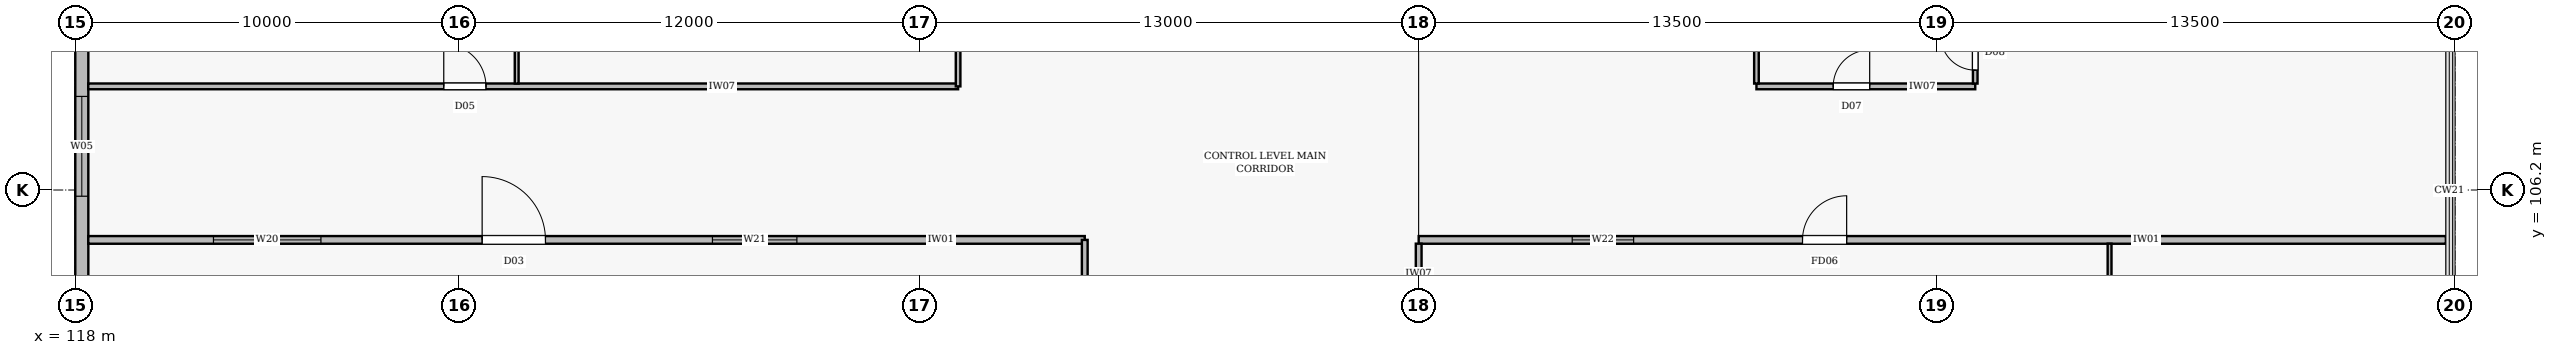
"""IFC4 building model, lengths in metres.
Left out: names, types, materials, properties, quantities, classifications, styles, units other than length and angle.
Written with IfcOpenShell. Run it as: python <this file> out.ifc"""

import sys

from ifc_helpers import new_model, si_unit, direction, frame, frame_2d, origin, place, context, subcontext, project, spatial, rectangle, extrude, element, fill, save


model = new_model("IFC4")
c1 = context("Model", 3, precision=1e-05, world=origin(), true_north=direction((0.0, 1.0)))
c2 = subcontext(c1, "Body", "Model", "MODEL_VIEW")
j1 = project(units=[si_unit("LENGTHUNIT", "METRE"), si_unit("PLANEANGLEUNIT", "RADIAN")], contexts=[c1])
p1 = place(None, origin())
s1 = spatial("IfcSite", under=j1, at=p1, CompositionType="ELEMENT")
p2 = place(p1, origin())
s2 = spatial("IfcBuilding", under=s1, at=p2, CompositionType="ELEMENT")
p3 = place(p2, frame((0.0, 0.0, 17.4)))
s3 = spatial("IfcBuildingStorey", under=s2, at=p3, CompositionType="ELEMENT", Elevation=17.4)
p4 = place(p3, frame((118.17, 101.023, 0.0), z_axis=(0.0, 0.0, 1.0), x_axis=(0.0, 1.0, 0.0)))
e1 = element("IfcWall", 1, at=p4, inside=s3, PredefinedType="STANDARD", context=c2, shape_type="SweptSolid", body=[
    extrude(rectangle(XDim=10.354, YDim=0.34, at=frame_2d((5.177, 0.0))), origin(), (0.0, 0.0, 1.0), 3.22),
])
p5 = place(p4, frame((5.015, 0.0, 0.58)))
e2 = element("IfcOpeningElement", 2, at=p5, cuts=e1, PredefinedType="OPENING", context=c2, shape_type="SweptSolid", body=[
    extrude(rectangle(XDim=2.6, YDim=2.4, at=frame_2d((1.3, 1.2))), frame((0.0, 0.182, 0.0), z_axis=(0.0, -1.0, 0.0), x_axis=(1.0, 0.0, 0.0)), (0.0, 0.0, 1.0), 0.364),
])
p6 = place(p3, frame((118.338, 104.9, 0.0), z_axis=(0.0, 0.0, 1.0), x_axis=(1.0, 0.0, 0.0)))
e3 = element("IfcWall", 3, at=p6, inside=s3, PredefinedType="PARTITIONING", context=c2, shape_type="SweptSolid", body=[
    extrude(rectangle(XDim=25.962, YDim=0.2, at=frame_2d((12.981, 0.0))), origin(), (0.0, 0.0, 1.0), 3.31),
])
p7 = place(p6, frame((10.262, 0.0, 0.005)))
e4 = element("IfcOpeningElement", 4, at=p7, cuts=e3, PredefinedType="OPENING", context=c2, shape_type="SweptSolid", body=[
    extrude(rectangle(XDim=1.65, YDim=2.2, at=frame_2d((0.825, 1.1))), frame((0.0, 0.112, 0.0), z_axis=(0.0, -1.0, 0.0), x_axis=(1.0, 0.0, 0.0)), (0.0, 0.0, 1.0), 0.224),
])
p8 = place(p6, frame((3.262, 0.0, 1.05)))
e5 = element("IfcOpeningElement", 5, at=p8, cuts=e3, PredefinedType="OPENING", context=c2, shape_type="SweptSolid", body=[
    extrude(rectangle(XDim=2.8, YDim=1.8, at=frame_2d((1.4, 0.9))), frame((0.0, 0.112, 0.0), z_axis=(0.0, -1.0, 0.0), x_axis=(1.0, 0.0, 0.0)), (0.0, 0.0, 1.0), 0.224),
])
p9 = place(p6, frame((16.262, 0.0, 1.05)))
e6 = element("IfcOpeningElement", 6, at=p9, cuts=e3, PredefinedType="OPENING", context=c2, shape_type="SweptSolid", body=[
    extrude(rectangle(XDim=2.2, YDim=1.6, at=frame_2d((1.1, 0.8))), frame((0.0, 0.112, 0.0), z_axis=(0.0, -1.0, 0.0), x_axis=(1.0, 0.0, 0.0)), (0.0, 0.0, 1.0), 0.224),
])
p10 = place(p3, frame((153.0, 104.9, 0.0), z_axis=(0.0, 0.0, 1.0), x_axis=(1.0, 0.0, 0.0)))
e7 = element("IfcWall", 7, at=p10, inside=s3, PredefinedType="PARTITIONING", context=c2, shape_type="SweptSolid", body=[
    extrude(rectangle(XDim=26.762, YDim=0.2, at=frame_2d((13.381, 0.0))), origin(), (0.0, 0.0, 1.0), 3.31),
])
p11 = place(p10, frame((10.0, 0.0, 0.005)))
e8 = element("IfcOpeningElement", 8, at=p11, cuts=e7, PredefinedType="OPENING", context=c2, shape_type="SweptSolid", body=[
    extrude(rectangle(XDim=1.15, YDim=2.15, at=frame_2d((0.575, 1.075))), frame((0.0, 0.112, 0.0), z_axis=(0.0, -1.0, 0.0), x_axis=(1.0, 0.0, 0.0)), (0.0, 0.0, 1.0), 0.224),
])
p12 = place(p10, frame((4.0, 0.0, 1.05)))
e9 = element("IfcOpeningElement", 9, at=p12, cuts=e7, PredefinedType="OPENING", context=c2, shape_type="SweptSolid", body=[
    extrude(rectangle(XDim=1.6, YDim=1.5, at=frame_2d((0.8, 0.75))), frame((0.0, 0.112, 0.0), z_axis=(0.0, -1.0, 0.0), x_axis=(1.0, 0.0, 0.0)), (0.0, 0.0, 1.0), 0.224),
])
p13 = place(p3, frame((144.3, 89.7, 0.0), z_axis=(0.0, 0.0, 1.0), x_axis=(0.0, 1.0, 0.0)))
e10 = element("IfcWall", 10, at=p13, inside=s3, PredefinedType="PARTITIONING", context=c2, shape_type="SweptSolid", body=[
    extrude(rectangle(XDim=15.2, YDim=0.15, at=frame_2d((7.6, 0.0))), origin(), (0.0, 0.0, 1.0), 3.12),
])
p14 = place(p13, frame((6.0, 0.0, 0.005)))
e11 = element("IfcOpeningElement", 11, at=p14, cuts=e10, PredefinedType="OPENING", context=c2, shape_type="SweptSolid", body=[
    extrude(rectangle(XDim=1.1, YDim=2.1, at=frame_2d((0.55, 1.05))), frame((0.0, 0.087, 0.0), z_axis=(0.0, -1.0, 0.0), x_axis=(1.0, 0.0, 0.0)), (0.0, 0.0, 1.0), 0.174),
])
p15 = place(p3, frame((153.0, 100.8, 0.0), z_axis=(0.0, 0.0, 1.0), x_axis=(0.0, 1.0, 0.0)))
e12 = element("IfcWall", 12, at=p15, inside=s3, PredefinedType="PARTITIONING", context=c2, shape_type="SweptSolid", body=[
    extrude(rectangle(XDim=4.002, YDim=0.15, at=frame_2d((2.001, 0.0))), origin(), (0.0, 0.0, 1.0), 3.12),
])
p16 = place(p15, frame((1.5, 0.0, 0.005)))
e13 = element("IfcOpeningElement", 13, at=p16, cuts=e12, PredefinedType="OPENING", context=c2, shape_type="SweptSolid", body=[
    extrude(rectangle(XDim=0.95, YDim=2.1, at=frame_2d((0.475, 1.05))), frame((0.0, 0.087, 0.0), z_axis=(0.0, -1.0, 0.0), x_axis=(1.0, 0.0, 0.0)), (0.0, 0.0, 1.0), 0.174),
])
p17 = place(p3, frame((118.338, 108.9, 0.0), z_axis=(0.0, 0.0, 1.0), x_axis=(1.0, 0.0, 0.0)))
e14 = element("IfcWall", 14, at=p17, inside=s3, PredefinedType="PARTITIONING", context=c2, shape_type="SweptSolid", body=[
    extrude(rectangle(XDim=22.662, YDim=0.15, at=frame_2d((11.331, 0.0))), origin(), (0.0, 0.0, 1.0), 3.31),
])
p18 = place(p17, frame((9.262, 0.0, 0.005)))
e15 = element("IfcOpeningElement", 15, at=p18, cuts=e14, PredefinedType="OPENING", context=c2, shape_type="SweptSolid", body=[
    extrude(rectangle(XDim=1.1, YDim=2.1, at=frame_2d((0.55, 1.05))), frame((0.0, 0.087, 0.0), z_axis=(0.0, -1.0, 0.0), x_axis=(1.0, 0.0, 0.0)), (0.0, 0.0, 1.0), 0.174),
])
p19 = place(p3, frame((141.0, 108.9, 0.0), z_axis=(0.0, 0.0, 1.0), x_axis=(0.0, 1.0, 0.0)))
e16 = element("IfcWall", 16, at=p19, inside=s3, PredefinedType="PARTITIONING", context=c2, shape_type="SweptSolid", body=[
    extrude(rectangle(XDim=3.4, YDim=0.12, at=frame_2d((1.7, 0.0))), origin(), (0.0, 0.0, 1.0), 3.12),
])
p20 = place(p3, frame((161.8, 108.9, 0.0), z_axis=(0.0, 0.0, 1.0), x_axis=(1.0, 0.0, 0.0)))
e17 = element("IfcWall", 17, at=p20, inside=s3, PredefinedType="PARTITIONING", context=c2, shape_type="SweptSolid", body=[
    extrude(rectangle(XDim=5.7, YDim=0.15, at=frame_2d((2.85, 0.0))), origin(), (0.0, 0.0, 1.0), 3.31),
])
p21 = place(p20, frame((2.0, 0.0, 0.005)))
e18 = element("IfcOpeningElement", 18, at=p21, cuts=e17, PredefinedType="OPENING", context=c2, shape_type="SweptSolid", body=[
    extrude(rectangle(XDim=0.95, YDim=2.1, at=frame_2d((0.475, 1.05))), frame((0.0, 0.087, 0.0), z_axis=(0.0, -1.0, 0.0), x_axis=(1.0, 0.0, 0.0)), (0.0, 0.0, 1.0), 0.174),
])
p22 = place(p3, frame((167.5, 108.973, 0.0), z_axis=(0.0, 0.0, 1.0), x_axis=(0.0, 1.0, 0.0)))
e19 = element("IfcWall", 19, at=p22, inside=s3, PredefinedType="PARTITIONING", context=c2, shape_type="SweptSolid", body=[
    extrude(rectangle(XDim=6.427, YDim=0.12, at=frame_2d((3.213, 0.0))), origin(), (0.0, 0.0, 1.0), 3.12),
])
p23 = place(p22, frame((0.35, 0.0, 0.005)))
e20 = element("IfcOpeningElement", 20, at=p23, cuts=e19, PredefinedType="OPENING", context=c2, shape_type="SweptSolid", body=[
    extrude(rectangle(XDim=0.9, YDim=2.1, at=frame_2d((0.45, 1.05))), frame((0.0, 0.072, 0.0), z_axis=(0.0, -1.0, 0.0), x_axis=(1.0, 0.0, 0.0)), (0.0, 0.0, 1.0), 0.144),
])
p24 = place(p3, frame((161.8, 108.973, 0.0), z_axis=(0.0, 0.0, 1.0), x_axis=(0.0, 1.0, 0.0)))
e21 = element("IfcWall", 21, at=p24, inside=s3, PredefinedType="PARTITIONING", context=c2, shape_type="SweptSolid", body=[
    extrude(rectangle(XDim=13.189, YDim=0.12, at=frame_2d((6.595, 0.0))), origin(), (0.0, 0.0, 1.0), 3.12),
])
p25 = place(p3, frame((129.5, 108.973, 0.0), z_axis=(0.0, 0.0, 1.0), x_axis=(0.0, 1.0, 0.0)))
e22 = element("IfcWall", 22, at=p25, inside=s3, PredefinedType="MOVABLE", context=c2, shape_type="SweptSolid", body=[
    extrude(rectangle(XDim=13.189, YDim=0.1, at=frame_2d((6.595, 0.0))), origin(), (0.0, 0.0, 1.0), 3.22),
])
p26 = place(p3, frame((171.0, 96.473, 0.0), z_axis=(0.0, 0.0, 1.0), x_axis=(0.0, 1.0, 0.0)))
e23 = element("IfcWall", 23, at=p26, inside=s3, PredefinedType="MOVABLE", context=c2, shape_type="SweptSolid", body=[
    extrude(rectangle(XDim=8.329, YDim=0.1, at=frame_2d((4.165, 0.0))), origin(), (0.0, 0.0, 1.0), 3.12),
])
p27 = place(p5, origin())
e24 = element("IfcWindow", 24, at=p27, inside=s3, PartitioningType="DOUBLE_PANEL_VERTICAL", PredefinedType="WINDOW", context=c2, shape_type="SweptSolid", body=[
    extrude(rectangle(XDim=2.6, YDim=2.4, at=frame_2d((1.3, 1.2))), frame((0.0, 0.03, 0.0), z_axis=(0.0, -1.0, 0.0), x_axis=(1.0, 0.0, 0.0)), (0.0, 0.0, 1.0), 0.06),
])
fill(e2, e24)
p28 = place(p7, origin())
e25 = element("IfcDoor", 25, at=p28, inside=s3, OperationType="DOUBLE_DOOR_SINGLE_SWING", PredefinedType="DOOR", context=c2, shape_type="SweptSolid", body=[
    extrude(rectangle(XDim=1.65, YDim=2.2, at=frame_2d((0.825, 1.1))), frame((0.0, 0.025, 0.0), z_axis=(0.0, -1.0, 0.0), x_axis=(1.0, 0.0, 0.0)), (0.0, 0.0, 1.0), 0.05),
])
fill(e4, e25)
p29 = place(p8, origin())
e26 = element("IfcWindow", 26, at=p29, inside=s3, PartitioningType="DOUBLE_PANEL_VERTICAL", PredefinedType="WINDOW", context=c2, shape_type="SweptSolid", body=[
    extrude(rectangle(XDim=2.8, YDim=1.8, at=frame_2d((1.4, 0.9))), frame((0.0, 0.03, 0.0), z_axis=(0.0, -1.0, 0.0), x_axis=(1.0, 0.0, 0.0)), (0.0, 0.0, 1.0), 0.06),
])
fill(e5, e26)
p30 = place(p9, origin())
e27 = element("IfcWindow", 27, at=p30, inside=s3, PartitioningType="DOUBLE_PANEL_VERTICAL", PredefinedType="WINDOW", context=c2, shape_type="SweptSolid", body=[
    extrude(rectangle(XDim=2.2, YDim=1.6, at=frame_2d((1.1, 0.8))), frame((0.0, 0.03, 0.0), z_axis=(0.0, -1.0, 0.0), x_axis=(1.0, 0.0, 0.0)), (0.0, 0.0, 1.0), 0.06),
])
fill(e6, e27)
p31 = place(p11, origin())
e28 = element("IfcDoor", 28, at=p31, inside=s3, OperationType="SINGLE_SWING_RIGHT", PredefinedType="DOOR", context=c2, shape_type="SweptSolid", body=[
    extrude(rectangle(XDim=1.15, YDim=2.15, at=frame_2d((0.575, 1.075))), frame((0.0, 0.025, 0.0), z_axis=(0.0, -1.0, 0.0), x_axis=(1.0, 0.0, 0.0)), (0.0, 0.0, 1.0), 0.05),
])
fill(e8, e28)
p32 = place(p12, origin())
e29 = element("IfcWindow", 29, at=p32, inside=s3, PartitioningType="DOUBLE_PANEL_VERTICAL", PredefinedType="WINDOW", context=c2, shape_type="SweptSolid", body=[
    extrude(rectangle(XDim=1.6, YDim=1.5, at=frame_2d((0.8, 0.75))), frame((0.0, 0.03, 0.0), z_axis=(0.0, -1.0, 0.0), x_axis=(1.0, 0.0, 0.0)), (0.0, 0.0, 1.0), 0.06),
])
fill(e9, e29)
p33 = place(p18, origin())
e30 = element("IfcDoor", 30, at=p33, inside=s3, OperationType="SINGLE_SWING_LEFT", PredefinedType="DOOR", context=c2, shape_type="SweptSolid", body=[
    extrude(rectangle(XDim=1.1, YDim=2.1, at=frame_2d((0.55, 1.05))), frame((0.0, 0.025, 0.0), z_axis=(0.0, -1.0, 0.0), x_axis=(1.0, 0.0, 0.0)), (0.0, 0.0, 1.0), 0.05),
])
fill(e15, e30)
p34 = place(p21, origin())
e31 = element("IfcDoor", 31, at=p34, inside=s3, OperationType="SINGLE_SWING_RIGHT", PredefinedType="DOOR", context=c2, shape_type="SweptSolid", body=[
    extrude(rectangle(XDim=0.95, YDim=2.1, at=frame_2d((0.475, 1.05))), frame((0.0, 0.025, 0.0), z_axis=(0.0, -1.0, 0.0), x_axis=(1.0, 0.0, 0.0)), (0.0, 0.0, 1.0), 0.05),
])
fill(e18, e31)
p35 = place(p23, origin())
e32 = element("IfcDoor", 32, at=p35, inside=s3, OperationType="SINGLE_SWING_RIGHT", PredefinedType="DOOR", context=c2, shape_type="SweptSolid", body=[
    extrude(rectangle(XDim=0.9, YDim=2.1, at=frame_2d((0.45, 1.05))), frame((0.0, 0.025, 0.0), z_axis=(0.0, -1.0, 0.0), x_axis=(1.0, 0.0, 0.0)), (0.0, 0.0, 1.0), 0.05),
])
fill(e20, e32)
save(model, sys.argv[1])
